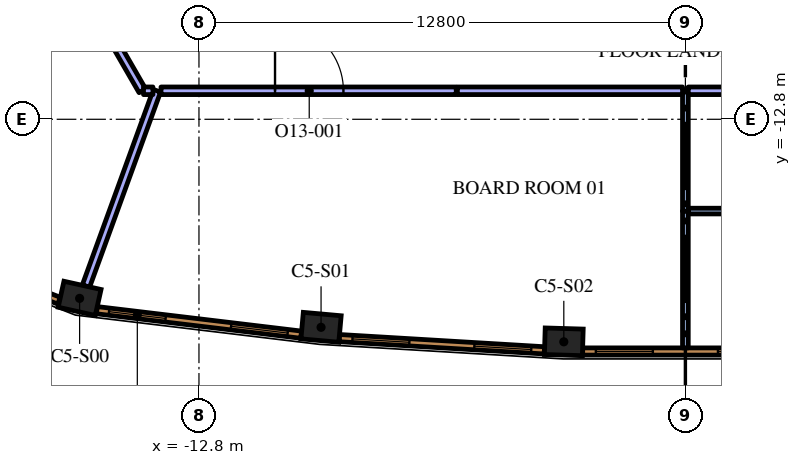
"""IFC4 building model, lengths in metres.
Left out: names, types, materials, properties, quantities, classifications, styles, units other than length and angle.
Written with IfcOpenShell. Run it as: python <this file> out.ifc"""

import sys

from ifc_helpers import new_model, si_unit, direction, frame, frame_2d, origin, origin_2d, place, context, subcontext, project, spatial, rectangle, extrude, element, fill, save


model = new_model("IFC4")
c1 = context("Model", 3, precision=1e-05, world=origin(), true_north=direction((0.0, 1.0)))
c2 = subcontext(c1, "Body", "Model", "MODEL_VIEW")
j1 = project(units=[si_unit("LENGTHUNIT", "METRE"), si_unit("PLANEANGLEUNIT", "RADIAN")], contexts=[c1])
p1 = place(None, origin())
s1 = spatial("IfcSite", under=j1, at=p1, CompositionType="ELEMENT")
p2 = place(p1, origin())
s2 = spatial("IfcBuilding", under=s1, at=p2, CompositionType="ELEMENT")
p3 = place(p2, frame((0.0, 0.0, 300.6)))
s3 = spatial("IfcBuildingStorey", under=s2, at=p3, CompositionType="ELEMENT", Elevation=300.6)
for number, where, z_axis, x_axis in (
    (1, (-15.941, -17.512, 0.0), (0.0, 0.0, 1.0), (0.976, -0.217, 0.0)),
    (2, (-9.587, -18.274, 0.0), (0.0, 0.0, 1.0), (0.996, -0.089, 0.0)),
    (3, (-3.199, -18.655, 0.0), (0.0, 0.0, 1.0), (1.0, -0.03, 0.0)),
):
    element("IfcColumn", number, at=place(p3, frame(where, z_axis=z_axis, x_axis=x_axis)), inside=s3, PredefinedType="COLUMN", context=c2, shape_type="SweptSolid", body=[
        extrude(rectangle(XDim=1.0, YDim=0.7, at=origin_2d()), origin(), (0.0, 0.0, 1.0), 4.2),
    ])
p4 = place(p3, frame((0.0, -15.211, 0.0), z_axis=(0.0, 0.0, 1.0), x_axis=(0.0, -1.0, 0.0)))
e4 = element("IfcWall", 4, at=p4, inside=s3, PredefinedType="PARTITIONING", context=c2, shape_type="SweptSolid", body=[
    extrude(rectangle(XDim=3.604, YDim=0.15, at=frame_2d((1.802, 0.0))), origin(), (0.0, 0.0, 1.0), 3.55),
])
p5 = place(p3, frame((0.0, -12.05, 0.0), z_axis=(0.0, 0.0, 1.0), x_axis=(0.0, -1.0, 0.0)))
e5 = element("IfcWall", 5, at=p5, inside=s3, PredefinedType="PARTITIONING", context=c2, shape_type="SweptSolid", body=[
    extrude(rectangle(XDim=3.169, YDim=0.15, at=frame_2d((1.584, 0.0))), origin(), (0.0, 0.0, 1.0), 3.55),
])
p6 = place(p3, frame((-15.774, -17.19, 0.0), z_axis=(0.0, 0.0, 1.0), x_axis=(0.341821907823, 0.93976474893, 0.0)))
e6 = element("IfcWall", 6, at=p6, inside=s3, PredefinedType="PARTITIONING", context=c2, shape_type="SweptSolid", body=[
    extrude(rectangle(XDim=5.469, YDim=0.2, at=frame_2d((2.735, 0.0))), origin(), (0.0, 0.0, 1.0), 3.55),
])
p7 = place(p3, frame((-6.0, -12.05, 0.0), z_axis=(0.0, 0.0, 1.0), x_axis=(1.0, 0.0, 0.0)))
e7 = element("IfcWall", 7, at=p7, inside=s3, PredefinedType="PARTITIONING", context=c2, shape_type="SweptSolid", body=[
    extrude(rectangle(XDim=5.925, YDim=0.2, at=frame_2d((2.962, 0.0))), origin(), (0.0, 0.0, 1.0), 3.55),
])
p8 = place(p3, frame((-13.799, -12.05, 0.0), z_axis=(0.0, 0.0, 1.0), x_axis=(1.0, 0.0, 0.0)))
e8 = element("IfcWall", 8, at=p8, inside=s3, PredefinedType="PARTITIONING", context=c2, shape_type="SweptSolid", body=[
    extrude(rectangle(XDim=7.769, YDim=0.2, at=frame_2d((3.884, 0.0))), origin(), (0.0, 0.0, 1.0), 3.55),
])
p9 = place(p8, frame((3.0, 0.0, 0.0)))
e9 = element("IfcOpeningElement", 9, at=p9, cuts=e8, PredefinedType="OPENING", context=c2, shape_type="SweptSolid", body=[
    extrude(rectangle(XDim=1.8, YDim=2.1, at=frame_2d((0.9, 1.05))), frame((0.0, 0.11, 0.0), z_axis=(0.0, -1.0, 0.0), x_axis=(1.0, 0.0, 0.0)), (0.0, 0.0, 1.0), 0.22),
])
p10 = place(p3, frame((0.075, -15.215, 0.0), z_axis=(0.0, 0.0, 1.0), x_axis=(1.0, 0.0, 0.0)))
e10 = element("IfcWall", 10, at=p10, inside=s3, PredefinedType="PARTITIONING", context=c2, shape_type="SweptSolid", body=[
    extrude(rectangle(XDim=3.022, YDim=0.15, at=frame_2d((1.511, 0.0))), origin(), (0.0, 0.0, 1.0), 3.55),
])
p11 = place(p3, frame((0.075, -12.05, 0.0), z_axis=(0.0, 0.0, 1.0), x_axis=(1.0, 0.0, 0.0)))
e11 = element("IfcWall", 11, at=p11, inside=s3, PredefinedType="PARTITIONING", context=c2, shape_type="SweptSolid", body=[
    extrude(rectangle(XDim=5.925, YDim=0.2, at=frame_2d((2.962, 0.0))), origin(), (0.0, 0.0, 1.0), 3.55),
])
p12 = place(p3, frame((-17.565, -6.376, 0.0), z_axis=(0.0, 0.0, 1.0), x_axis=(0.499994477444, -0.86602859221, 0.0)))
e12 = element("IfcWall", 12, at=p12, inside=s3, PredefinedType="PARTITIONING", context=c2, shape_type="SweptSolid", body=[
    extrude(rectangle(XDim=6.552, YDim=0.2, at=frame_2d((3.276, 0.0))), origin(), (0.0, 0.0, 1.0), 3.55),
])
p13 = place(p3, frame((-14.26, -12.05, 0.0), z_axis=(0.0, 0.0, 1.0), x_axis=(1.0, 0.0, 0.0)))
e13 = element("IfcWall", 13, at=p13, inside=s3, PredefinedType="PARTITIONING", context=c2, shape_type="SweptSolid", body=[
    extrude(rectangle(XDim=0.248, YDim=0.2, at=frame_2d((0.124, 0.0))), origin(), (0.0, 0.0, 1.0), 3.55),
])
p14 = place(p3, frame((-15.487, -17.823, 0.0), z_axis=(0.0, 0.0, 1.0), x_axis=(0.992885582795, -0.119072328769, 0.0)))
e14 = element("IfcWall", 14, at=p14, inside=s3, PredefinedType="SOLIDWALL", context=c2, shape_type="SweptSolid", body=[
    extrude(rectangle(XDim=5.415, YDim=0.19, at=frame_2d((2.708, 0.0))), origin(), (0.0, 0.0, 1.0), 3.95),
])
p15 = place(p14, frame((0.323, 0.0, 0.6)))
e15 = element("IfcOpeningElement", 15, at=p15, cuts=e14, PredefinedType="OPENING", context=c2, shape_type="SweptSolid", body=[
    extrude(rectangle(XDim=1.5, YDim=2.85, at=frame_2d((0.75, 1.425))), frame((0.0, 0.105, 0.0), z_axis=(0.0, -1.0, 0.0), x_axis=(1.0, 0.0, 0.0)), (0.0, 0.0, 1.0), 0.21),
])
p16 = place(p14, frame((3.558, 0.0, 0.6)))
e16 = element("IfcOpeningElement", 16, at=p16, cuts=e14, PredefinedType="OPENING", context=c2, shape_type="SweptSolid", body=[
    extrude(rectangle(XDim=1.5, YDim=2.85, at=frame_2d((0.75, 1.425))), frame((0.0, 0.105, 0.0), z_axis=(0.0, -1.0, 0.0), x_axis=(1.0, 0.0, 0.0)), (0.0, 0.0, 1.0), 0.21),
])
p17 = place(p3, frame((-9.107, -18.558, 0.0), z_axis=(0.0, 0.0, 1.0), x_axis=(0.998221492823, -0.059614186786, 0.0)))
e17 = element("IfcWall", 17, at=p17, inside=s3, PredefinedType="SOLIDWALL", context=c2, shape_type="SweptSolid", body=[
    extrude(rectangle(XDim=5.406, YDim=0.19, at=frame_2d((2.703, 0.0))), origin(), (0.0, 0.0, 1.0), 3.95),
])
p18 = place(p17, frame((0.346, 0.0, 0.6)))
e18 = element("IfcOpeningElement", 18, at=p18, cuts=e17, PredefinedType="OPENING", context=c2, shape_type="SweptSolid", body=[
    extrude(rectangle(XDim=1.5, YDim=2.85, at=frame_2d((0.75, 1.425))), frame((0.0, 0.105, 0.0), z_axis=(0.0, -1.0, 0.0), x_axis=(1.0, 0.0, 0.0)), (0.0, 0.0, 1.0), 0.21),
])
p19 = place(p17, frame((3.559, 0.0, 0.6)))
e19 = element("IfcOpeningElement", 19, at=p19, cuts=e17, PredefinedType="OPENING", context=c2, shape_type="SweptSolid", body=[
    extrude(rectangle(XDim=1.5, YDim=2.85, at=frame_2d((0.75, 1.425))), frame((0.0, 0.105, 0.0), z_axis=(0.0, -1.0, 0.0), x_axis=(1.0, 0.0, 0.0)), (0.0, 0.0, 1.0), 0.21),
])
p20 = place(p3, frame((-2.703, -18.91, 0.0), z_axis=(0.0, 0.0, 1.0), x_axis=(1.0, 0.0, 0.0)))
e20 = element("IfcWall", 20, at=p20, inside=s3, PredefinedType="SOLIDWALL", context=c2, shape_type="SweptSolid", body=[
    extrude(rectangle(XDim=5.406, YDim=0.19, at=frame_2d((2.703, 0.0))), origin(), (0.0, 0.0, 1.0), 3.95),
])
p21 = place(p20, frame((0.346, 0.0, 0.6)))
e21 = element("IfcOpeningElement", 21, at=p21, cuts=e20, PredefinedType="OPENING", context=c2, shape_type="SweptSolid", body=[
    extrude(rectangle(XDim=1.5, YDim=2.85, at=frame_2d((0.75, 1.425))), frame((0.0, 0.105, 0.0), z_axis=(0.0, -1.0, 0.0), x_axis=(1.0, 0.0, 0.0)), (0.0, 0.0, 1.0), 0.21),
])
p22 = place(p20, frame((3.56, 0.0, 0.6)))
e22 = element("IfcOpeningElement", 22, at=p22, cuts=e20, PredefinedType="OPENING", context=c2, shape_type="SweptSolid", body=[
    extrude(rectangle(XDim=1.5, YDim=2.85, at=frame_2d((0.75, 1.425))), frame((0.0, 0.105, 0.0), z_axis=(0.0, -1.0, 0.0), x_axis=(1.0, 0.0, 0.0)), (0.0, 0.0, 1.0), 0.21),
])
p23 = place(p3, frame((-19.496, -16.392, 0.0), z_axis=(0.0, 0.0, 1.0), x_axis=(0.93100888477, -0.364996515709, 0.0)))
e23 = element("IfcWall", 23, at=p23, inside=s3, PredefinedType="SOLIDWALL", context=c2, shape_type="SweptSolid", body=[
    extrude(rectangle(XDim=3.237, YDim=0.19, at=frame_2d((1.618, 0.0))), origin(), (0.0, 0.0, 1.0), 3.95),
])
p24 = place(p23, frame((1.068, 0.0, 0.6)))
e24 = element("IfcOpeningElement", 24, at=p24, cuts=e23, PredefinedType="OPENING", context=c2, shape_type="SweptSolid", body=[
    extrude(rectangle(XDim=1.1, YDim=2.85, at=frame_2d((0.55, 1.425))), frame((0.0, 0.105, 0.0), z_axis=(0.0, -1.0, 0.0), x_axis=(1.0, 0.0, 0.0)), (0.0, 0.0, 1.0), 0.21),
])
p25 = place(p9, origin())
e25 = element("IfcDoor", 25, at=p25, inside=s3, OperationType="DOUBLE_DOOR_SINGLE_SWING", PredefinedType="DOOR", context=c2, shape_type="SweptSolid", body=[
    extrude(rectangle(XDim=1.8, YDim=2.1, at=frame_2d((0.9, 1.05))), frame((0.0, 0.025, 0.0), z_axis=(0.0, -1.0, 0.0), x_axis=(1.0, 0.0, 0.0)), (0.0, 0.0, 1.0), 0.05),
])
fill(e9, e25)
p26 = place(p15, origin())
e26 = element("IfcWindow", 26, at=p26, inside=s3, PartitioningType="SINGLE_PANEL", PredefinedType="WINDOW", context=c2, shape_type="SweptSolid", body=[
    extrude(rectangle(XDim=1.5, YDim=2.85, at=frame_2d((0.75, 1.425))), frame((0.0, 0.045, 0.0), z_axis=(0.0, -1.0, 0.0), x_axis=(1.0, 0.0, 0.0)), (0.0, 0.0, 1.0), 0.06),
])
fill(e15, e26)
p27 = place(p16, origin())
e27 = element("IfcWindow", 27, at=p27, inside=s3, PartitioningType="SINGLE_PANEL", PredefinedType="WINDOW", context=c2, shape_type="SweptSolid", body=[
    extrude(rectangle(XDim=1.5, YDim=2.85, at=frame_2d((0.75, 1.425))), frame((0.0, 0.045, 0.0), z_axis=(0.0, -1.0, 0.0), x_axis=(1.0, 0.0, 0.0)), (0.0, 0.0, 1.0), 0.06),
])
fill(e16, e27)
p28 = place(p18, origin())
e28 = element("IfcWindow", 28, at=p28, inside=s3, PartitioningType="SINGLE_PANEL", PredefinedType="WINDOW", context=c2, shape_type="SweptSolid", body=[
    extrude(rectangle(XDim=1.5, YDim=2.85, at=frame_2d((0.75, 1.425))), frame((0.0, 0.045, 0.0), z_axis=(0.0, -1.0, 0.0), x_axis=(1.0, 0.0, 0.0)), (0.0, 0.0, 1.0), 0.06),
])
fill(e18, e28)
p29 = place(p19, origin())
e29 = element("IfcWindow", 29, at=p29, inside=s3, PartitioningType="SINGLE_PANEL", PredefinedType="WINDOW", context=c2, shape_type="SweptSolid", body=[
    extrude(rectangle(XDim=1.5, YDim=2.85, at=frame_2d((0.75, 1.425))), frame((0.0, 0.045, 0.0), z_axis=(0.0, -1.0, 0.0), x_axis=(1.0, 0.0, 0.0)), (0.0, 0.0, 1.0), 0.06),
])
fill(e19, e29)
p30 = place(p21, origin())
e30 = element("IfcWindow", 30, at=p30, inside=s3, PartitioningType="SINGLE_PANEL", PredefinedType="WINDOW", context=c2, shape_type="SweptSolid", body=[
    extrude(rectangle(XDim=1.5, YDim=2.85, at=frame_2d((0.75, 1.425))), frame((0.0, 0.045, 0.0), z_axis=(0.0, -1.0, 0.0), x_axis=(1.0, 0.0, 0.0)), (0.0, 0.0, 1.0), 0.06),
])
fill(e21, e30)
p31 = place(p22, origin())
e31 = element("IfcWindow", 31, at=p31, inside=s3, PartitioningType="SINGLE_PANEL", PredefinedType="WINDOW", context=c2, shape_type="SweptSolid", body=[
    extrude(rectangle(XDim=1.5, YDim=2.85, at=frame_2d((0.75, 1.425))), frame((0.0, 0.045, 0.0), z_axis=(0.0, -1.0, 0.0), x_axis=(1.0, 0.0, 0.0)), (0.0, 0.0, 1.0), 0.06),
])
fill(e22, e31)
save(model, sys.argv[1])
